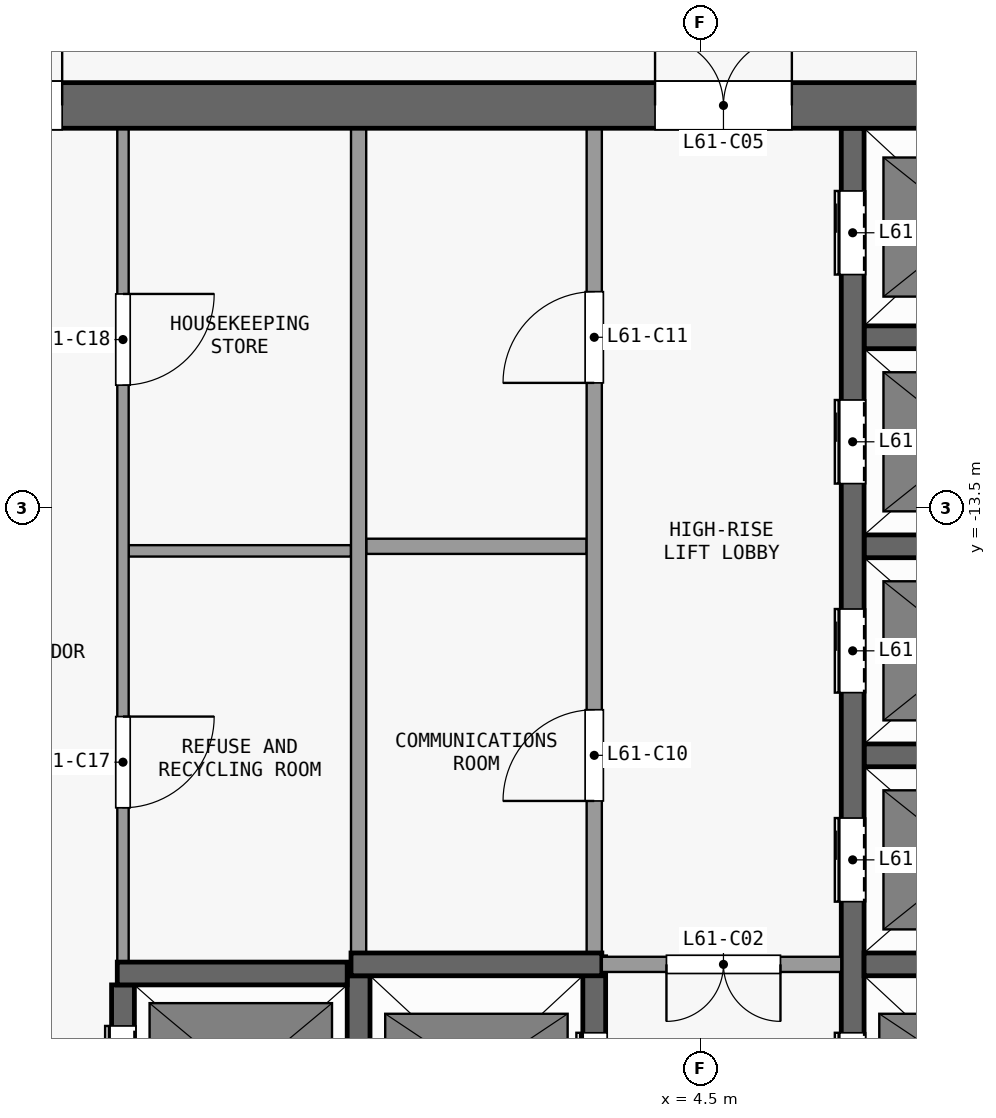
"""IFC4 building model, lengths in metres.
Left out: names, types, materials, properties, quantities, classifications, styles, units other than length and angle.
Written with IfcOpenShell. Run it as: python <this file> out.ifc"""

import sys

from ifc_helpers import new_model, si_unit, direction, frame, frame_2d, origin, place, context, subcontext, project, spatial, rectangle, extrude, element, fill, save


model = new_model("IFC4")
c1 = context("Model", 3, precision=1e-05, world=origin(), true_north=direction((0.0, 1.0)))
c2 = subcontext(c1, "Body", "Model", "MODEL_VIEW")
j1 = project(units=[si_unit("LENGTHUNIT", "METRE"), si_unit("PLANEANGLEUNIT", "RADIAN")], contexts=[c1])
p1 = place(None, origin())
s1 = spatial("IfcSite", under=j1, at=p1, CompositionType="ELEMENT")
p2 = place(p1, origin())
s2 = spatial("IfcBuilding", under=s1, at=p2, CompositionType="ELEMENT")
p3 = place(p2, frame((0.0, 0.0, 241.1)))
s3 = spatial("IfcBuildingStorey", under=s2, at=p3, CompositionType="ELEMENT", Elevation=241.1)
p4 = place(p3, frame((-13.2, -8.2, 0.0), z_axis=(0.0, 0.0, 1.0), x_axis=(1.0, 0.0, 0.0)))
e1 = element("IfcWall", 1, at=p4, inside=s3, PredefinedType="SHEAR", context=c2, shape_type="SweptSolid", body=[
    extrude(rectangle(XDim=26.4, YDim=0.6, at=frame_2d((13.2, 0.0))), origin(), (0.0, 0.0, 1.0), 3.3),
])
p5 = place(p4, frame((7.5, 0.0, 0.0)))
e2 = element("IfcOpeningElement", 2, at=p5, cuts=e1, PredefinedType="OPENING", context=c2, shape_type="SweptSolid", body=[
    extrude(rectangle(XDim=1.8, YDim=2.1, at=frame_2d((0.9, 1.05))), frame((0.0, 0.31, 0.0), z_axis=(0.0, -1.0, 0.0), x_axis=(1.0, 0.0, 0.0)), (0.0, 0.0, 1.0), 0.62),
])
p6 = place(p4, frame((17.1, 0.0, 0.0)))
e3 = element("IfcOpeningElement", 3, at=p6, cuts=e1, PredefinedType="OPENING", context=c2, shape_type="SweptSolid", body=[
    extrude(rectangle(XDim=1.8, YDim=2.1, at=frame_2d((0.9, 1.05))), frame((0.0, 0.31, 0.0), z_axis=(0.0, -1.0, 0.0), x_axis=(1.0, 0.0, 0.0)), (0.0, 0.0, 1.0), 0.62),
])
p7 = place(p4, frame((2.425, 0.0, 0.0)))
e4 = element("IfcOpeningElement", 4, at=p7, cuts=e1, PredefinedType="OPENING", context=c2, shape_type="SweptSolid", body=[
    extrude(rectangle(XDim=0.9, YDim=2.1, at=frame_2d((0.45, 1.05))), frame((0.0, 0.31, 0.0), z_axis=(0.0, -1.0, 0.0), x_axis=(1.0, 0.0, 0.0)), (0.0, 0.0, 1.0), 0.62),
])
p8 = place(p4, frame((23.075, 0.0, 0.0)))
e5 = element("IfcOpeningElement", 5, at=p8, cuts=e1, PredefinedType="OPENING", context=c2, shape_type="SweptSolid", body=[
    extrude(rectangle(XDim=0.9, YDim=2.1, at=frame_2d((0.45, 1.05))), frame((0.0, 0.31, 0.0), z_axis=(0.0, -1.0, 0.0), x_axis=(1.0, 0.0, 0.0)), (0.0, 0.0, 1.0), 0.62),
])
p9 = place(p3, frame((-3.175, -19.62, 0.0), z_axis=(0.0, 0.0, 1.0), x_axis=(1.0, 0.0, 0.0)))
e6 = element("IfcWall", 6, at=p9, inside=s3, PredefinedType="SHEAR", context=c2, shape_type="SweptSolid", body=[
    extrude(rectangle(XDim=3.025, YDim=0.3, at=frame_2d((1.513, 0.0))), origin(), (0.0, 0.0, 1.0), 3.3),
])
p10 = place(p3, frame((-0.1, -19.5, 0.0), z_axis=(0.0, 0.0, 1.0), x_axis=(1.0, 0.0, 0.0)))
e7 = element("IfcWall", 7, at=p10, inside=s3, PredefinedType="SHEAR", context=c2, shape_type="SweptSolid", body=[
    extrude(rectangle(XDim=3.3, YDim=0.3, at=frame_2d((1.65, 0.0))), origin(), (0.0, 0.0, 1.0), 3.3),
])
p11 = place(p3, frame((6.35, -19.5, 0.0), z_axis=(0.0, 0.0, 1.0), x_axis=(-1.0, 0.0, 0.0)))
e8 = element("IfcWall", 8, at=p11, inside=s3, PredefinedType="PARTITIONING", context=c2, shape_type="SweptSolid", body=[
    extrude(rectangle(XDim=3.15, YDim=0.2, at=frame_2d((1.575, 0.0))), origin(), (0.0, 0.0, 1.0), 3.3),
])
p12 = place(p11, frame((0.8, 0.0, 0.0)))
e9 = element("IfcOpeningElement", 9, at=p12, cuts=e8, PredefinedType="OPENING", context=c2, shape_type="SweptSolid", body=[
    extrude(rectangle(XDim=1.5, YDim=2.1, at=frame_2d((0.75, 1.05))), frame((0.0, 0.11, 0.0), z_axis=(0.0, -1.0, 0.0), x_axis=(1.0, 0.0, 0.0)), (0.0, 0.0, 1.0), 0.22),
])
for number, where, z_axis, x_axis in (
    (10, (6.65, -19.5, 0.0), (0.0, 0.0, 1.0), (1.0, 0.0, 0.0)),
    (11, (6.65, -16.75, 0.0), (0.0, 0.0, 1.0), (1.0, 0.0, 0.0)),
):
    element("IfcWall", number, at=place(p3, frame(where, z_axis=z_axis, x_axis=x_axis)), inside=s3, PredefinedType="SHEAR", context=c2, shape_type="SweptSolid", body=[
        extrude(rectangle(XDim=2.8, YDim=0.3, at=frame_2d((1.4, 0.0))), origin(), (0.0, 0.0, 1.0), 3.3),
    ])
p13 = place(p3, frame((-3.025, -14.06, 0.0), z_axis=(0.0, 0.0, 1.0), x_axis=(1.0, 0.0, 0.0)))
e12 = element("IfcWall", 12, at=p13, inside=s3, PredefinedType="PARTITIONING", context=c2, shape_type="SweptSolid", body=[
    extrude(rectangle(XDim=2.925, YDim=0.15, at=frame_2d((1.462, 0.0))), origin(), (0.0, 0.0, 1.0), 3.3),
])
p14 = place(p3, frame((0.1, -14.0, 0.0), z_axis=(0.0, 0.0, 1.0), x_axis=(1.0, 0.0, 0.0)))
e13 = element("IfcWall", 13, at=p14, inside=s3, PredefinedType="PARTITIONING", context=c2, shape_type="SweptSolid", body=[
    extrude(rectangle(XDim=2.9, YDim=0.2, at=frame_2d((1.45, 0.0))), origin(), (0.0, 0.0, 1.0), 3.3),
])
for number, where, z_axis, x_axis in (
    (14, (6.65, -14.0, 0.0), (0.0, 0.0, 1.0), (1.0, 0.0, 0.0)),
    (15, (6.65, -11.25, 0.0), (0.0, 0.0, 1.0), (1.0, 0.0, 0.0)),
):
    element("IfcWall", number, at=place(p3, frame(where, z_axis=z_axis, x_axis=x_axis)), inside=s3, PredefinedType="SHEAR", context=c2, shape_type="SweptSolid", body=[
        extrude(rectangle(XDim=2.8, YDim=0.3, at=frame_2d((1.4, 0.0))), origin(), (0.0, 0.0, 1.0), 3.3),
    ])
p15 = place(p3, frame((-3.1, -22.25, 0.0), z_axis=(0.0, 0.0, 1.0), x_axis=(0.0, 1.0, 0.0)))
e16 = element("IfcWall", 16, at=p15, inside=s3, PredefinedType="SHEAR", context=c2, shape_type="SweptSolid", body=[
    extrude(rectangle(XDim=2.48, YDim=0.3, at=frame_2d((1.24, 0.0))), origin(), (0.0, 0.0, 1.0), 3.3),
])
p16 = place(p15, frame((0.54, 0.0, 0.0)))
e17 = element("IfcOpeningElement", 17, at=p16, cuts=e16, PredefinedType="OPENING", context=c2, shape_type="SweptSolid", body=[
    extrude(rectangle(XDim=1.4, YDim=2.1, at=frame_2d((0.7, 1.05))), frame((0.0, 0.16, 0.0), z_axis=(0.0, -1.0, 0.0), x_axis=(1.0, 0.0, 0.0)), (0.0, 0.0, 1.0), 0.32),
])
p17 = place(p3, frame((-3.1, -8.5, 0.0), z_axis=(0.0, 0.0, 1.0), x_axis=(0.0, -1.0, 0.0)))
e18 = element("IfcWall", 18, at=p17, inside=s3, PredefinedType="PARTITIONING", context=c2, shape_type="SweptSolid", body=[
    extrude(rectangle(XDim=10.97, YDim=0.15, at=frame_2d((5.485, 0.0))), origin(), (0.0, 0.0, 1.0), 3.3),
])
p18 = place(p17, frame((7.74, 0.0, 0.0)))
e19 = element("IfcOpeningElement", 19, at=p18, cuts=e18, PredefinedType="OPENING", context=c2, shape_type="SweptSolid", body=[
    extrude(rectangle(XDim=1.2, YDim=2.1, at=frame_2d((0.6, 1.05))), frame((0.0, 0.085, 0.0), z_axis=(0.0, -1.0, 0.0), x_axis=(1.0, 0.0, 0.0)), (0.0, 0.0, 1.0), 0.17),
])
p19 = place(p17, frame((2.18, 0.0, 0.0)))
e20 = element("IfcOpeningElement", 20, at=p19, cuts=e18, PredefinedType="OPENING", context=c2, shape_type="SweptSolid", body=[
    extrude(rectangle(XDim=1.2, YDim=2.1, at=frame_2d((0.6, 1.05))), frame((0.0, 0.085, 0.0), z_axis=(0.0, -1.0, 0.0), x_axis=(1.0, 0.0, 0.0)), (0.0, 0.0, 1.0), 0.17),
])
p20 = place(p3, frame((0.0, -22.25, 0.0), z_axis=(0.0, 0.0, 1.0), x_axis=(0.0, 1.0, 0.0)))
e21 = element("IfcWall", 21, at=p20, inside=s3, PredefinedType="SHEAR", context=c2, shape_type="SweptSolid", body=[
    extrude(rectangle(XDim=2.6, YDim=0.3, at=frame_2d((1.3, 0.0))), origin(), (0.0, 0.0, 1.0), 3.3),
])
p21 = place(p3, frame((0.0, -19.35, 0.0), z_axis=(0.0, 0.0, 1.0), x_axis=(0.0, 1.0, 0.0)))
e22 = element("IfcWall", 22, at=p21, inside=s3, PredefinedType="PARTITIONING", context=c2, shape_type="SweptSolid", body=[
    extrude(rectangle(XDim=10.85, YDim=0.2, at=frame_2d((5.425, 0.0))), origin(), (0.0, 0.0, 1.0), 3.3),
])
p22 = place(p3, frame((3.1, -22.25, 0.0), z_axis=(0.0, 0.0, 1.0), x_axis=(0.0, 1.0, 0.0)))
e23 = element("IfcWall", 23, at=p22, inside=s3, PredefinedType="SHEAR", context=c2, shape_type="SweptSolid", body=[
    extrude(rectangle(XDim=2.85, YDim=0.3, at=frame_2d((1.425, 0.0))), origin(), (0.0, 0.0, 1.0), 3.3),
])
p23 = place(p22, frame((0.75, 0.0, 0.0)))
e24 = element("IfcOpeningElement", 24, at=p23, cuts=e23, PredefinedType="OPENING", context=c2, shape_type="SweptSolid", body=[
    extrude(rectangle(XDim=1.1, YDim=2.1, at=frame_2d((0.55, 1.05))), frame((0.0, 0.16, 0.0), z_axis=(0.0, -1.0, 0.0), x_axis=(1.0, 0.0, 0.0)), (0.0, 0.0, 1.0), 0.32),
])
p24 = place(p3, frame((3.1, -19.6, 0.0), z_axis=(0.0, 0.0, 1.0), x_axis=(0.0, 1.0, 0.0)))
e25 = element("IfcWall", 25, at=p24, inside=s3, PredefinedType="PARTITIONING", context=c2, shape_type="SweptSolid", body=[
    extrude(rectangle(XDim=11.1, YDim=0.2, at=frame_2d((5.55, 0.0))), origin(), (0.0, 0.0, 1.0), 3.3),
])
p25 = place(p24, frame((2.25, 0.0, 0.0)))
e26 = element("IfcOpeningElement", 26, at=p25, cuts=e25, PredefinedType="OPENING", context=c2, shape_type="SweptSolid", body=[
    extrude(rectangle(XDim=1.2, YDim=2.1, at=frame_2d((0.6, 1.05))), frame((0.0, 0.11, 0.0), z_axis=(0.0, -1.0, 0.0), x_axis=(1.0, 0.0, 0.0)), (0.0, 0.0, 1.0), 0.22),
])
p26 = place(p24, frame((7.75, 0.0, 0.0)))
e27 = element("IfcOpeningElement", 27, at=p26, cuts=e25, PredefinedType="OPENING", context=c2, shape_type="SweptSolid", body=[
    extrude(rectangle(XDim=1.2, YDim=2.1, at=frame_2d((0.6, 1.05))), frame((0.0, 0.11, 0.0), z_axis=(0.0, -1.0, 0.0), x_axis=(1.0, 0.0, 0.0)), (0.0, 0.0, 1.0), 0.22),
])
p27 = place(p3, frame((6.5, -22.55, 0.0), z_axis=(0.0, 0.0, 1.0), x_axis=(0.0, 1.0, 0.0)))
e28 = element("IfcWall", 28, at=p27, inside=s3, PredefinedType="SHEAR", context=c2, shape_type="SweptSolid", body=[
    extrude(rectangle(XDim=14.05, YDim=0.3, at=frame_2d((7.025, 0.0))), origin(), (0.0, 0.0, 1.0), 3.3),
])
p28 = place(p27, frame((1.05, 0.0, 0.0)))
e29 = element("IfcOpeningElement", 29, at=p28, cuts=e28, PredefinedType="OPENING", context=c2, shape_type="SweptSolid", body=[
    extrude(rectangle(XDim=1.1, YDim=2.1, at=frame_2d((0.55, 1.05))), frame((0.0, 0.16, 0.0), z_axis=(0.0, -1.0, 0.0), x_axis=(1.0, 0.0, 0.0)), (0.0, 0.0, 1.0), 0.32),
])
p29 = place(p27, frame((3.875, 0.0, 0.0)))
e30 = element("IfcOpeningElement", 30, at=p29, cuts=e28, PredefinedType="OPENING", context=c2, shape_type="SweptSolid", body=[
    extrude(rectangle(XDim=1.1, YDim=2.1, at=frame_2d((0.55, 1.05))), frame((0.0, 0.16, 0.0), z_axis=(0.0, -1.0, 0.0), x_axis=(1.0, 0.0, 0.0)), (0.0, 0.0, 1.0), 0.32),
])
p30 = place(p27, frame((6.625, 0.0, 0.0)))
e31 = element("IfcOpeningElement", 31, at=p30, cuts=e28, PredefinedType="OPENING", context=c2, shape_type="SweptSolid", body=[
    extrude(rectangle(XDim=1.1, YDim=2.1, at=frame_2d((0.55, 1.05))), frame((0.0, 0.16, 0.0), z_axis=(0.0, -1.0, 0.0), x_axis=(1.0, 0.0, 0.0)), (0.0, 0.0, 1.0), 0.32),
])
p31 = place(p27, frame((9.375, 0.0, 0.0)))
e32 = element("IfcOpeningElement", 32, at=p31, cuts=e28, PredefinedType="OPENING", context=c2, shape_type="SweptSolid", body=[
    extrude(rectangle(XDim=1.1, YDim=2.1, at=frame_2d((0.55, 1.05))), frame((0.0, 0.16, 0.0), z_axis=(0.0, -1.0, 0.0), x_axis=(1.0, 0.0, 0.0)), (0.0, 0.0, 1.0), 0.32),
])
p32 = place(p27, frame((12.125, 0.0, 0.0)))
e33 = element("IfcOpeningElement", 33, at=p32, cuts=e28, PredefinedType="OPENING", context=c2, shape_type="SweptSolid", body=[
    extrude(rectangle(XDim=1.1, YDim=2.1, at=frame_2d((0.55, 1.05))), frame((0.0, 0.16, 0.0), z_axis=(0.0, -1.0, 0.0), x_axis=(1.0, 0.0, 0.0)), (0.0, 0.0, 1.0), 0.32),
])
p33 = place(p23, origin())
e34 = element("IfcDoor", 34, at=p33, inside=s3, OperationType="DOUBLE_DOOR_SLIDING", PredefinedType="DOOR", context=c2, shape_type="SweptSolid", body=[
    extrude(rectangle(XDim=1.1, YDim=2.1, at=frame_2d((0.55, 1.05))), frame((0.0, 0.025, 0.0), z_axis=(0.0, -1.0, 0.0), x_axis=(1.0, 0.0, 0.0)), (0.0, 0.0, 1.0), 0.05),
])
fill(e24, e34)
p34 = place(p28, origin())
e35 = element("IfcDoor", 35, at=p34, inside=s3, OperationType="DOUBLE_DOOR_SLIDING", PredefinedType="DOOR", context=c2, shape_type="SweptSolid", body=[
    extrude(rectangle(XDim=1.1, YDim=2.1, at=frame_2d((0.55, 1.05))), frame((0.0, 0.025, 0.0), z_axis=(0.0, -1.0, 0.0), x_axis=(1.0, 0.0, 0.0)), (0.0, 0.0, 1.0), 0.05),
])
fill(e29, e35)
p35 = place(p29, origin())
e36 = element("IfcDoor", 36, at=p35, inside=s3, OperationType="DOUBLE_DOOR_SLIDING", PredefinedType="DOOR", context=c2, shape_type="SweptSolid", body=[
    extrude(rectangle(XDim=1.1, YDim=2.1, at=frame_2d((0.55, 1.05))), frame((0.0, 0.025, 0.0), z_axis=(0.0, -1.0, 0.0), x_axis=(1.0, 0.0, 0.0)), (0.0, 0.0, 1.0), 0.05),
])
fill(e30, e36)
p36 = place(p30, origin())
e37 = element("IfcDoor", 37, at=p36, inside=s3, OperationType="DOUBLE_DOOR_SLIDING", PredefinedType="DOOR", context=c2, shape_type="SweptSolid", body=[
    extrude(rectangle(XDim=1.1, YDim=2.1, at=frame_2d((0.55, 1.05))), frame((0.0, 0.025, 0.0), z_axis=(0.0, -1.0, 0.0), x_axis=(1.0, 0.0, 0.0)), (0.0, 0.0, 1.0), 0.05),
])
fill(e31, e37)
p37 = place(p31, origin())
e38 = element("IfcDoor", 38, at=p37, inside=s3, OperationType="DOUBLE_DOOR_SLIDING", PredefinedType="DOOR", context=c2, shape_type="SweptSolid", body=[
    extrude(rectangle(XDim=1.1, YDim=2.1, at=frame_2d((0.55, 1.05))), frame((0.0, 0.025, 0.0), z_axis=(0.0, -1.0, 0.0), x_axis=(1.0, 0.0, 0.0)), (0.0, 0.0, 1.0), 0.05),
])
fill(e32, e38)
p38 = place(p32, origin())
e39 = element("IfcDoor", 39, at=p38, inside=s3, OperationType="DOUBLE_DOOR_SLIDING", PredefinedType="DOOR", context=c2, shape_type="SweptSolid", body=[
    extrude(rectangle(XDim=1.1, YDim=2.1, at=frame_2d((0.55, 1.05))), frame((0.0, 0.025, 0.0), z_axis=(0.0, -1.0, 0.0), x_axis=(1.0, 0.0, 0.0)), (0.0, 0.0, 1.0), 0.05),
])
fill(e33, e39)
p39 = place(p16, origin())
e40 = element("IfcDoor", 40, at=p39, inside=s3, OperationType="DOUBLE_DOOR_SLIDING", PredefinedType="DOOR", context=c2, shape_type="SweptSolid", body=[
    extrude(rectangle(XDim=1.4, YDim=2.1, at=frame_2d((0.7, 1.05))), frame((0.0, 0.025, 0.0), z_axis=(0.0, -1.0, 0.0), x_axis=(1.0, 0.0, 0.0)), (0.0, 0.0, 1.0), 0.05),
])
fill(e17, e40)
p40 = place(p12, origin())
e41 = element("IfcDoor", 41, at=p40, inside=s3, OperationType="DOUBLE_DOOR_SINGLE_SWING", PredefinedType="DOOR", context=c2, shape_type="SweptSolid", body=[
    extrude(rectangle(XDim=1.5, YDim=2.1, at=frame_2d((0.75, 1.05))), frame((0.0, 0.025, 0.0), z_axis=(0.0, -1.0, 0.0), x_axis=(1.0, 0.0, 0.0)), (0.0, 0.0, 1.0), 0.05),
])
fill(e9, e41)
p41 = place(p5, origin())
e42 = element("IfcDoor", 42, at=p41, inside=s3, OperationType="DOUBLE_DOOR_SINGLE_SWING", PredefinedType="DOOR", context=c2, shape_type="SweptSolid", body=[
    extrude(rectangle(XDim=1.8, YDim=2.1, at=frame_2d((0.9, 1.05))), frame((0.0, 0.025, 0.0), z_axis=(0.0, -1.0, 0.0), x_axis=(1.0, 0.0, 0.0)), (0.0, 0.0, 1.0), 0.05),
])
fill(e2, e42)
p42 = place(p6, origin())
e43 = element("IfcDoor", 43, at=p42, inside=s3, OperationType="DOUBLE_DOOR_SINGLE_SWING", PredefinedType="DOOR", context=c2, shape_type="SweptSolid", body=[
    extrude(rectangle(XDim=1.8, YDim=2.1, at=frame_2d((0.9, 1.05))), frame((0.0, 0.025, 0.0), z_axis=(0.0, -1.0, 0.0), x_axis=(1.0, 0.0, 0.0)), (0.0, 0.0, 1.0), 0.05),
])
fill(e3, e43)
p43 = place(p25, origin())
e44 = element("IfcDoor", 44, at=p43, inside=s3, OperationType="SINGLE_SWING_LEFT", PredefinedType="DOOR", context=c2, shape_type="SweptSolid", body=[
    extrude(rectangle(XDim=1.2, YDim=2.1, at=frame_2d((0.6, 1.05))), frame((0.0, 0.025, 0.0), z_axis=(0.0, -1.0, 0.0), x_axis=(1.0, 0.0, 0.0)), (0.0, 0.0, 1.0), 0.05),
])
fill(e26, e44)
p44 = place(p26, origin())
e45 = element("IfcDoor", 45, at=p44, inside=s3, OperationType="SINGLE_SWING_LEFT", PredefinedType="DOOR", context=c2, shape_type="SweptSolid", body=[
    extrude(rectangle(XDim=1.2, YDim=2.1, at=frame_2d((0.6, 1.05))), frame((0.0, 0.025, 0.0), z_axis=(0.0, -1.0, 0.0), x_axis=(1.0, 0.0, 0.0)), (0.0, 0.0, 1.0), 0.05),
])
fill(e27, e45)
p45 = place(p18, origin())
e46 = element("IfcDoor", 46, at=p45, inside=s3, OperationType="SINGLE_SWING_LEFT", PredefinedType="DOOR", context=c2, shape_type="SweptSolid", body=[
    extrude(rectangle(XDim=1.2, YDim=2.1, at=frame_2d((0.6, 1.05))), frame((0.0, 0.025, 0.0), z_axis=(0.0, -1.0, 0.0), x_axis=(1.0, 0.0, 0.0)), (0.0, 0.0, 1.0), 0.05),
])
fill(e19, e46)
p46 = place(p19, origin())
e47 = element("IfcDoor", 47, at=p46, inside=s3, OperationType="SINGLE_SWING_LEFT", PredefinedType="DOOR", context=c2, shape_type="SweptSolid", body=[
    extrude(rectangle(XDim=1.2, YDim=2.1, at=frame_2d((0.6, 1.05))), frame((0.0, 0.025, 0.0), z_axis=(0.0, -1.0, 0.0), x_axis=(1.0, 0.0, 0.0)), (0.0, 0.0, 1.0), 0.05),
])
fill(e20, e47)
save(model, sys.argv[1])
